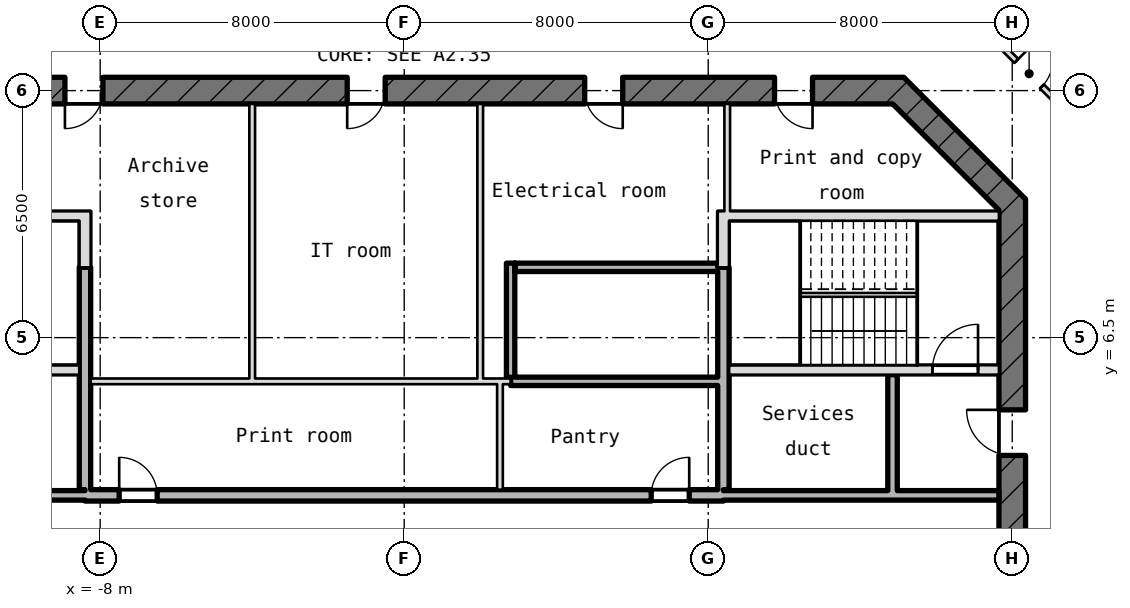
"""IFC4 building model, lengths in metres.
Left out: names, types, materials, properties, quantities, classifications, styles, units other than length and angle.
Written with IfcOpenShell. Run it as: python <this file> out.ifc"""

import sys

from ifc_helpers import new_model, si_unit, direction, frame, frame_2d, origin, place, context, subcontext, project, spatial, rectangle, extrude, element, fill, save


model = new_model("IFC4")
c1 = context("Model", 3, precision=1e-05, world=origin(), true_north=direction((0.0, 1.0)))
c2 = subcontext(c1, "Body", "Model", "MODEL_VIEW")
j1 = project(units=[si_unit("LENGTHUNIT", "METRE"), si_unit("PLANEANGLEUNIT", "RADIAN")], contexts=[c1])
p1 = place(None, origin())
s1 = spatial("IfcSite", under=j1, at=p1, CompositionType="ELEMENT")
p2 = place(p1, origin())
s2 = spatial("IfcBuilding", under=s1, at=p2, CompositionType="ELEMENT")
p3 = place(p2, frame((0.0, 0.0, 384.1)))
s3 = spatial("IfcBuildingStorey", under=s2, at=p3, CompositionType="ELEMENT", Elevation=384.1)
p4 = place(p3, frame((16.0, -10.145, -0.18), z_axis=(0.0, 0.0, 1.0), x_axis=(0.0, 1.0, 0.0)))
e1 = element("IfcWall", 1, at=p4, inside=s3, PredefinedType="SHEAR", context=c2, shape_type="SweptSolid", body=[
    extrude(rectangle(XDim=20.29, YDim=0.7, at=frame_2d((10.145, 0.0))), origin(), (0.0, 0.0, 1.0), 4.15),
])
p5 = place(p4, frame((8.945, 0.0, 0.18)))
e2 = element("IfcOpeningElement", 2, at=p5, cuts=e1, PredefinedType="OPENING", context=c2, shape_type="SweptSolid", body=[
    extrude(rectangle(XDim=2.4, YDim=2.1, at=frame_2d((1.2, 1.05))), frame((0.0, 0.36, 0.0), z_axis=(0.0, -1.0, 0.0), x_axis=(1.0, 0.0, 0.0)), (0.0, 0.0, 1.0), 0.72),
])
p6 = place(p4, frame((13.545, 0.0, 0.18)))
e3 = element("IfcOpeningElement", 3, at=p6, cuts=e1, PredefinedType="OPENING", context=c2, shape_type="SweptSolid", body=[
    extrude(rectangle(XDim=1.2, YDim=2.1, at=frame_2d((0.6, 1.05))), frame((0.0, 0.36, 0.0), z_axis=(0.0, -1.0, 0.0), x_axis=(1.0, 0.0, 0.0)), (0.0, 0.0, 1.0), 0.72),
])
p7 = place(p4, frame((2.4, 0.0, 0.18)))
e4 = element("IfcOpeningElement", 4, at=p7, cuts=e1, PredefinedType="OPENING", context=c2, shape_type="SweptSolid", body=[
    extrude(rectangle(XDim=1.2, YDim=2.1, at=frame_2d((0.6, 1.05))), frame((0.0, 0.36, 0.0), z_axis=(0.0, -1.0, 0.0), x_axis=(1.0, 0.0, 0.0)), (0.0, 0.0, 1.0), 0.72),
])
p8 = place(p3, frame((16.103, 9.897, -0.18), z_axis=(0.0, 0.0, 1.0), x_axis=(-0.707106781187, 0.707106781187, 0.0)))
e5 = element("IfcWall", 5, at=p8, inside=s3, PredefinedType="SHEAR", context=c2, shape_type="SweptSolid", body=[
    extrude(rectangle(XDim=4.533, YDim=0.7, at=frame_2d((2.266, 0.0))), origin(), (0.0, 0.0, 1.0), 4.15),
])
p9 = place(p3, frame((13.145, 13.0, -0.18), z_axis=(0.0, 0.0, 1.0), x_axis=(-1.0, 0.0, 0.0)))
e6 = element("IfcWall", 6, at=p9, inside=s3, PredefinedType="SHEAR", context=c2, shape_type="SweptSolid", body=[
    extrude(rectangle(XDim=26.29, YDim=0.7, at=frame_2d((13.145, 0.0))), origin(), (0.0, 0.0, 1.0), 4.15),
])
p10 = place(p9, frame((21.073, 0.0, 0.18)))
e7 = element("IfcOpeningElement", 7, at=p10, cuts=e6, PredefinedType="OPENING", context=c2, shape_type="SweptSolid", body=[
    extrude(rectangle(XDim=1.0, YDim=2.1, at=frame_2d((0.5, 1.05))), frame((0.0, 0.36, 0.0), z_axis=(0.0, -1.0, 0.0), x_axis=(1.0, 0.0, 0.0)), (0.0, 0.0, 1.0), 0.72),
])
p11 = place(p9, frame((13.645, 0.0, 0.18)))
e8 = element("IfcOpeningElement", 8, at=p11, cuts=e6, PredefinedType="OPENING", context=c2, shape_type="SweptSolid", body=[
    extrude(rectangle(XDim=1.0, YDim=2.1, at=frame_2d((0.5, 1.05))), frame((0.0, 0.36, 0.0), z_axis=(0.0, -1.0, 0.0), x_axis=(1.0, 0.0, 0.0)), (0.0, 0.0, 1.0), 0.72),
])
p12 = place(p9, frame((7.395, 0.0, 0.18)))
e9 = element("IfcOpeningElement", 9, at=p12, cuts=e6, PredefinedType="OPENING", context=c2, shape_type="SweptSolid", body=[
    extrude(rectangle(XDim=1.0, YDim=2.1, at=frame_2d((0.5, 1.05))), frame((0.0, 0.36, 0.0), z_axis=(0.0, -1.0, 0.0), x_axis=(1.0, 0.0, 0.0)), (0.0, 0.0, 1.0), 0.72),
])
p13 = place(p9, frame((2.4, 0.0, 0.18)))
e10 = element("IfcOpeningElement", 10, at=p13, cuts=e6, PredefinedType="OPENING", context=c2, shape_type="SweptSolid", body=[
    extrude(rectangle(XDim=1.0, YDim=2.1, at=frame_2d((0.5, 1.05))), frame((0.0, 0.36, 0.0), z_axis=(0.0, -1.0, 0.0), x_axis=(1.0, 0.0, 0.0)), (0.0, 0.0, 1.0), 0.72),
])
p14 = place(p3, frame((-15.65, 2.35, 0.0), z_axis=(0.0, 0.0, 1.0), x_axis=(1.0, 0.0, 0.0)))
e11 = element("IfcWall", 11, at=p14, inside=s3, PredefinedType="STANDARD", context=c2, shape_type="SweptSolid", body=[
    extrude(rectangle(XDim=7.25, YDim=0.25, at=frame_2d((3.625, 0.0))), origin(), (0.0, 0.0, 1.0), 3.97),
])
p15 = place(p3, frame((-8.4, 2.35, -0.18), z_axis=(0.0, 0.0, 1.0), x_axis=(1.0, 0.0, 0.0)))
e12 = element("IfcWall", 12, at=p15, inside=s3, PredefinedType="SHEAR", context=c2, shape_type="SweptSolid", body=[
    extrude(rectangle(XDim=16.8, YDim=0.3, at=frame_2d((8.4, 0.0))), origin(), (0.0, 0.0, 1.0), 4.15),
])
p16 = place(p15, frame((0.9, 0.0, 0.18)))
e13 = element("IfcOpeningElement", 13, at=p16, cuts=e12, PredefinedType="OPENING", context=c2, shape_type="SweptSolid", body=[
    extrude(rectangle(XDim=1.0, YDim=2.1, at=frame_2d((0.5, 1.05))), frame((0.0, 0.16, 0.0), z_axis=(0.0, -1.0, 0.0), x_axis=(1.0, 0.0, 0.0)), (0.0, 0.0, 1.0), 0.32),
])
p17 = place(p15, frame((14.9, 0.0, 0.18)))
e14 = element("IfcOpeningElement", 14, at=p17, cuts=e12, PredefinedType="OPENING", context=c2, shape_type="SweptSolid", body=[
    extrude(rectangle(XDim=1.0, YDim=2.1, at=frame_2d((0.5, 1.05))), frame((0.0, 0.16, 0.0), z_axis=(0.0, -1.0, 0.0), x_axis=(1.0, 0.0, 0.0)), (0.0, 0.0, 1.0), 0.32),
])
p18 = place(p3, frame((8.4, 2.35, 0.0), z_axis=(0.0, 0.0, 1.0), x_axis=(1.0, 0.0, 0.0)))
e15 = element("IfcWall", 15, at=p18, inside=s3, PredefinedType="STANDARD", context=c2, shape_type="SweptSolid", body=[
    extrude(rectangle(XDim=7.25, YDim=0.25, at=frame_2d((3.625, 0.0))), origin(), (0.0, 0.0, 1.0), 3.97),
])
p19 = place(p3, frame((-8.25, 5.35, 0.0), z_axis=(0.0, 0.0, 1.0), x_axis=(1.0, 0.0, 0.0)))
e16 = element("IfcWall", 16, at=p19, inside=s3, PredefinedType="PARTITIONING", context=c2, shape_type="SweptSolid", body=[
    extrude(rectangle(XDim=11.05, YDim=0.15, at=frame_2d((5.525, 0.0))), origin(), (0.0, 0.0, 1.0), 3.97),
])
p20 = place(p3, frame((2.8, 5.35, 0.0), z_axis=(0.0, 0.0, 1.0), x_axis=(1.0, 0.0, 0.0)))
e17 = element("IfcWall", 17, at=p20, inside=s3, PredefinedType="STANDARD", context=c2, shape_type="SweptSolid", body=[
    extrude(rectangle(XDim=5.45, YDim=0.22, at=frame_2d((2.725, 0.0))), origin(), (0.0, 0.0, 1.0), 3.97),
])
p21 = place(p3, frame((-15.65, 5.65, -0.18), z_axis=(0.0, 0.0, 1.0), x_axis=(1.0, 0.0, 0.0)))
e18 = element("IfcWall", 18, at=p21, inside=s3, PredefinedType="SHEAR", context=c2, shape_type="SweptSolid", body=[
    extrude(rectangle(XDim=7.1, YDim=0.25, at=frame_2d((3.55, 0.0))), origin(), (0.0, 0.0, 1.0), 4.15),
])
p22 = place(p21, frame((0.55, 0.0, 0.18)))
e19 = element("IfcOpeningElement", 19, at=p22, cuts=e18, PredefinedType="OPENING", context=c2, shape_type="SweptSolid", body=[
    extrude(rectangle(XDim=1.2, YDim=2.1, at=frame_2d((0.6, 1.05))), frame((0.0, 0.135, 0.0), z_axis=(0.0, -1.0, 0.0), x_axis=(1.0, 0.0, 0.0)), (0.0, 0.0, 1.0), 0.27),
])
p23 = place(p3, frame((8.55, 5.65, -0.18), z_axis=(0.0, 0.0, 1.0), x_axis=(1.0, 0.0, 0.0)))
e20 = element("IfcWall", 20, at=p23, inside=s3, PredefinedType="SHEAR", context=c2, shape_type="SweptSolid", body=[
    extrude(rectangle(XDim=7.1, YDim=0.25, at=frame_2d((3.55, 0.0))), origin(), (0.0, 0.0, 1.0), 4.15),
])
p24 = place(p23, frame((5.35, 0.0, 0.18)))
e21 = element("IfcOpeningElement", 21, at=p24, cuts=e20, PredefinedType="OPENING", context=c2, shape_type="SweptSolid", body=[
    extrude(rectangle(XDim=1.2, YDim=2.1, at=frame_2d((0.6, 1.05))), frame((0.0, 0.135, 0.0), z_axis=(0.0, -1.0, 0.0), x_axis=(1.0, 0.0, 0.0)), (0.0, 0.0, 1.0), 0.27),
])
p25 = place(p3, frame((2.91, 8.35, 0.0), z_axis=(0.0, 0.0, 1.0), x_axis=(1.0, 0.0, 0.0)))
e22 = element("IfcWall", 22, at=p25, inside=s3, PredefinedType="STANDARD", context=c2, shape_type="SweptSolid", body=[
    extrude(rectangle(XDim=5.34, YDim=0.22, at=frame_2d((2.67, 0.0))), origin(), (0.0, 0.0, 1.0), 3.97),
])
for number, where, z_axis, x_axis in (
    (23, (-15.65, 9.7, -0.18), (0.0, 0.0, 1.0), (1.0, 0.0, 0.0)),
    (24, (8.55, 9.7, -0.18), (0.0, 0.0, 1.0), (1.0, 0.0, 0.0)),
):
    element("IfcWall", number, at=place(p3, frame(where, z_axis=z_axis, x_axis=x_axis)), inside=s3, PredefinedType="SHEAR", context=c2, shape_type="SweptSolid", body=[
        extrude(rectangle(XDim=7.1, YDim=0.25, at=frame_2d((3.55, 0.0))), origin(), (0.0, 0.0, 1.0), 4.15),
    ])
p26 = place(p3, frame((-8.4, 2.5, -0.18), z_axis=(0.0, 0.0, 1.0), x_axis=(0.0, 1.0, 0.0)))
e25 = element("IfcWall", 25, at=p26, inside=s3, PredefinedType="SHEAR", context=c2, shape_type="SweptSolid", body=[
    extrude(rectangle(XDim=5.85, YDim=0.3, at=frame_2d((2.925, 0.0))), origin(), (0.0, 0.0, 1.0), 4.15),
])
p27 = place(p3, frame((-8.4, 8.35, -0.18), z_axis=(0.0, 0.0, 1.0), x_axis=(0.0, 1.0, 0.0)))
e26 = element("IfcWall", 26, at=p27, inside=s3, PredefinedType="SHEAR", context=c2, shape_type="SweptSolid", body=[
    extrude(rectangle(XDim=1.475, YDim=0.3, at=frame_2d((0.737, 0.0))), origin(), (0.0, 0.0, 1.0), 4.15),
])
for number, where, z_axis, x_axis in (
    (27, (-4.0, 5.425, 0.0), (0.0, 0.0, 1.0), (0.0, 1.0, 0.0)),
    (28, (2.0, 5.425, 0.0), (0.0, 0.0, 1.0), (0.0, 1.0, 0.0)),
):
    element("IfcWall", number, at=place(p3, frame(where, z_axis=z_axis, x_axis=x_axis)), inside=s3, PredefinedType="PARTITIONING", context=c2, shape_type="SweptSolid", body=[
        extrude(rectangle(XDim=7.225, YDim=0.15, at=frame_2d((3.612, 0.0))), origin(), (0.0, 0.0, 1.0), 3.97),
    ])
p28 = place(p3, frame((2.52, 2.5, 0.0), z_axis=(0.0, 0.0, 1.0), x_axis=(0.0, 1.0, 0.0)))
e29 = element("IfcWall", 29, at=p28, inside=s3, PredefinedType="PARTITIONING", context=c2, shape_type="SweptSolid", body=[
    extrude(rectangle(XDim=2.775, YDim=0.15, at=frame_2d((1.387, 0.0))), origin(), (0.0, 0.0, 1.0), 3.97),
])
p29 = place(p3, frame((2.8, 5.46, 0.0), z_axis=(0.0, 0.0, 1.0), x_axis=(0.0, 1.0, 0.0)))
e30 = element("IfcWall", 30, at=p29, inside=s3, PredefinedType="STANDARD", context=c2, shape_type="SweptSolid", body=[
    extrude(rectangle(XDim=3.0, YDim=0.22, at=frame_2d((1.5, 0.0))), origin(), (0.0, 0.0, 1.0), 3.97),
])
p30 = place(p3, frame((8.4, 2.5, -0.18), z_axis=(0.0, 0.0, 1.0), x_axis=(0.0, 1.0, 0.0)))
e31 = element("IfcWall", 31, at=p30, inside=s3, PredefinedType="SHEAR", context=c2, shape_type="SweptSolid", body=[
    extrude(rectangle(XDim=5.85, YDim=0.3, at=frame_2d((2.925, 0.0))), origin(), (0.0, 0.0, 1.0), 4.15),
])
p31 = place(p3, frame((8.4, 8.35, -0.18), z_axis=(0.0, 0.0, 1.0), x_axis=(0.0, 1.0, 0.0)))
e32 = element("IfcWall", 32, at=p31, inside=s3, PredefinedType="SHEAR", context=c2, shape_type="SweptSolid", body=[
    extrude(rectangle(XDim=1.475, YDim=0.3, at=frame_2d((0.737, 0.0))), origin(), (0.0, 0.0, 1.0), 4.15),
])
p32 = place(p3, frame((8.5, 9.825, 0.0), z_axis=(0.0, 0.0, 1.0), x_axis=(0.0, 1.0, 0.0)))
e33 = element("IfcWall", 33, at=p32, inside=s3, PredefinedType="PARTITIONING", context=c2, shape_type="SweptSolid", body=[
    extrude(rectangle(XDim=2.825, YDim=0.15, at=frame_2d((1.413, 0.0))), origin(), (0.0, 0.0, 1.0), 3.97),
])
p33 = place(p3, frame((12.85, 2.475, 0.0), z_axis=(0.0, 0.0, 1.0), x_axis=(0.0, 1.0, 0.0)))
e34 = element("IfcWall", 34, at=p33, inside=s3, PredefinedType="STANDARD", context=c2, shape_type="SweptSolid", body=[
    extrude(rectangle(XDim=3.05, YDim=0.25, at=frame_2d((1.525, 0.0))), origin(), (0.0, 0.0, 1.0), 3.97),
])
p34 = place(p3, frame((14.139, 15.75, 0.0), z_axis=(0.0, 0.0, 1.0), x_axis=(0.707106781187, -0.707106781187, 0.0)))
e35 = element("IfcWall", 35, at=p34, inside=s3, PredefinedType="PARTITIONING", context=c2, shape_type="SweptSolid", body=[
    extrude(rectangle(XDim=6.521, YDim=0.15, at=frame_2d((3.26, 0.0))), origin(), (0.0, 0.0, 1.0), 3.97),
])
p35 = place(p34, frame((2.785, 0.0, 0.0)))
e36 = element("IfcOpeningElement", 36, at=p35, cuts=e35, PredefinedType="OPENING", context=c2, shape_type="SweptSolid", body=[
    extrude(rectangle(XDim=0.95, YDim=2.1, at=frame_2d((0.475, 1.05))), frame((0.0, 0.085, 0.0), z_axis=(0.0, -1.0, 0.0), x_axis=(1.0, 0.0, 0.0)), (0.0, 0.0, 1.0), 0.17),
])
p36 = place(p24, origin())
e37 = element("IfcDoor", 37, at=p36, inside=s3, OperationType="SINGLE_SWING_RIGHT", PredefinedType="DOOR", context=c2, shape_type="SweptSolid", body=[
    extrude(rectangle(XDim=1.2, YDim=2.1, at=frame_2d((0.6, 1.05))), frame((0.0, 0.025, 0.0), z_axis=(0.0, -1.0, 0.0), x_axis=(1.0, 0.0, 0.0)), (0.0, 0.0, 1.0), 0.05),
])
fill(e21, e37)
p37 = place(p6, origin())
e38 = element("IfcDoor", 38, at=p37, inside=s3, OperationType="SINGLE_SWING_RIGHT", PredefinedType="DOOR", context=c2, shape_type="SweptSolid", body=[
    extrude(rectangle(XDim=1.2, YDim=2.1, at=frame_2d((0.6, 1.05))), frame((0.0, 0.025, 0.0), z_axis=(0.0, -1.0, 0.0), x_axis=(1.0, 0.0, 0.0)), (0.0, 0.0, 1.0), 0.05),
])
fill(e3, e38)
p38 = place(p16, origin())
e39 = element("IfcDoor", 39, at=p38, inside=s3, OperationType="SINGLE_SWING_RIGHT", PredefinedType="DOOR", context=c2, shape_type="SweptSolid", body=[
    extrude(rectangle(XDim=1.0, YDim=2.1, at=frame_2d((0.5, 1.05))), frame((0.0, 0.025, 0.0), z_axis=(0.0, -1.0, 0.0), x_axis=(1.0, 0.0, 0.0)), (0.0, 0.0, 1.0), 0.05),
])
fill(e13, e39)
p39 = place(p17, origin())
e40 = element("IfcDoor", 40, at=p39, inside=s3, OperationType="SINGLE_SWING_RIGHT", PredefinedType="DOOR", context=c2, shape_type="SweptSolid", body=[
    extrude(rectangle(XDim=1.0, YDim=2.1, at=frame_2d((0.5, 1.05))), frame((0.0, 0.025, 0.0), z_axis=(0.0, -1.0, 0.0), x_axis=(1.0, 0.0, 0.0)), (0.0, 0.0, 1.0), 0.05),
])
fill(e14, e40)
p40 = place(p10, origin())
e41 = element("IfcDoor", 41, at=p40, inside=s3, OperationType="SINGLE_SWING_RIGHT", PredefinedType="DOOR", context=c2, shape_type="SweptSolid", body=[
    extrude(rectangle(XDim=1.0, YDim=2.1, at=frame_2d((0.5, 1.05))), frame((0.0, 0.025, 0.0), z_axis=(0.0, -1.0, 0.0), x_axis=(1.0, 0.0, 0.0)), (0.0, 0.0, 1.0), 0.05),
])
fill(e7, e41)
p41 = place(p11, origin())
e42 = element("IfcDoor", 42, at=p41, inside=s3, OperationType="SINGLE_SWING_RIGHT", PredefinedType="DOOR", context=c2, shape_type="SweptSolid", body=[
    extrude(rectangle(XDim=1.0, YDim=2.1, at=frame_2d((0.5, 1.05))), frame((0.0, 0.025, 0.0), z_axis=(0.0, -1.0, 0.0), x_axis=(1.0, 0.0, 0.0)), (0.0, 0.0, 1.0), 0.05),
])
fill(e8, e42)
p42 = place(p12, origin())
e43 = element("IfcDoor", 43, at=p42, inside=s3, OperationType="SINGLE_SWING_RIGHT", PredefinedType="DOOR", context=c2, shape_type="SweptSolid", body=[
    extrude(rectangle(XDim=1.0, YDim=2.1, at=frame_2d((0.5, 1.05))), frame((0.0, 0.025, 0.0), z_axis=(0.0, -1.0, 0.0), x_axis=(1.0, 0.0, 0.0)), (0.0, 0.0, 1.0), 0.05),
])
fill(e9, e43)
p43 = place(p13, origin())
e44 = element("IfcDoor", 44, at=p43, inside=s3, OperationType="SINGLE_SWING_RIGHT", PredefinedType="DOOR", context=c2, shape_type="SweptSolid", body=[
    extrude(rectangle(XDim=1.0, YDim=2.1, at=frame_2d((0.5, 1.05))), frame((0.0, 0.025, 0.0), z_axis=(0.0, -1.0, 0.0), x_axis=(1.0, 0.0, 0.0)), (0.0, 0.0, 1.0), 0.05),
])
fill(e10, e44)
p44 = place(p35, origin())
e45 = element("IfcDoor", 45, at=p44, inside=s3, OperationType="SINGLE_SWING_RIGHT", PredefinedType="DOOR", context=c2, shape_type="SweptSolid", body=[
    extrude(rectangle(XDim=0.95, YDim=2.1, at=frame_2d((0.475, 1.05))), frame((0.0, 0.025, 0.0), z_axis=(0.0, -1.0, 0.0), x_axis=(1.0, 0.0, 0.0)), (0.0, 0.0, 1.0), 0.05),
])
fill(e36, e45)
save(model, sys.argv[1])
